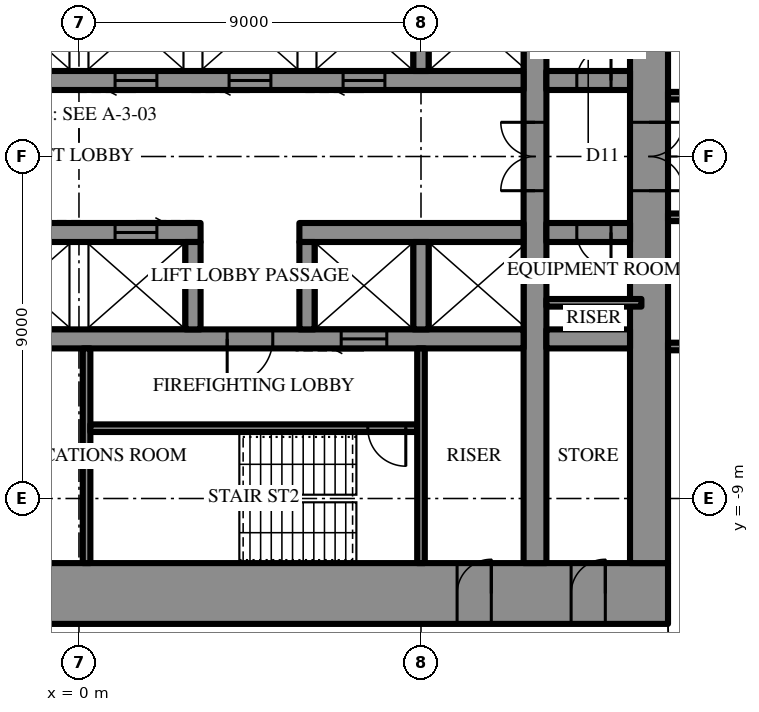
"""IFC4 building model, lengths in metres.
Left out: names, types, materials, properties, quantities, classifications, styles, units other than length and angle.
Written with IfcOpenShell. Run it as: python <this file> out.ifc"""

import sys

from ifc_helpers import new_model, si_unit, direction, frame, frame_2d, origin, place, context, subcontext, project, spatial, rectangle, extrude, element, fill, save


model = new_model("IFC4")
c1 = context("Model", 3, precision=1e-05, world=origin(), true_north=direction((0.0, 1.0)))
c2 = subcontext(c1, "Body", "Model", "MODEL_VIEW")
j1 = project(units=[si_unit("LENGTHUNIT", "METRE"), si_unit("PLANEANGLEUNIT", "RADIAN")], contexts=[c1])
p1 = place(None, origin())
s1 = spatial("IfcSite", under=j1, at=p1, CompositionType="ELEMENT")
p2 = place(p1, origin())
s2 = spatial("IfcBuilding", under=s1, at=p2, CompositionType="ELEMENT")
p3 = place(p2, frame((0.0, 0.0, 236.5)))
s3 = spatial("IfcBuildingStorey", under=s2, at=p3, CompositionType="ELEMENT", Elevation=236.5)
p4 = place(p3, frame((15.5, -11.5, 0.0), z_axis=(0.0, 0.0, 1.0), x_axis=(-1.0, 0.0, 0.0)))
e1 = element("IfcWall", 1, at=p4, inside=s3, PredefinedType="SHEAR", context=c2, shape_type="SweptSolid", body=[
    extrude(rectangle(XDim=31.0, YDim=1.6, at=frame_2d((15.5, 0.0))), origin(), (0.0, 0.0, 1.0), 4.2),
])
p5 = place(p4, frame((16.35, 0.0, 0.0)))
e2 = element("IfcOpeningElement", 2, at=p5, cuts=e1, PredefinedType="OPENING", context=c2, shape_type="SweptSolid", body=[
    extrude(rectangle(XDim=0.9, YDim=2.2, at=frame_2d((0.45, 1.1))), frame((0.0, 0.81, 0.0), z_axis=(0.0, -1.0, 0.0), x_axis=(1.0, 0.0, 0.0)), (0.0, 0.0, 1.0), 1.62),
])
p6 = place(p4, frame((19.35, 0.0, 0.0)))
e3 = element("IfcOpeningElement", 3, at=p6, cuts=e1, PredefinedType="OPENING", context=c2, shape_type="SweptSolid", body=[
    extrude(rectangle(XDim=0.9, YDim=2.2, at=frame_2d((0.45, 1.1))), frame((0.0, 0.81, 0.0), z_axis=(0.0, -1.0, 0.0), x_axis=(1.0, 0.0, 0.0)), (0.0, 0.0, 1.0), 1.62),
])
p7 = place(p4, frame((22.4, 0.0, 0.0)))
e4 = element("IfcOpeningElement", 4, at=p7, cuts=e1, PredefinedType="OPENING", context=c2, shape_type="SweptSolid", body=[
    extrude(rectangle(XDim=1.0, YDim=2.2, at=frame_2d((0.5, 1.1))), frame((0.0, 0.81, 0.0), z_axis=(0.0, -1.0, 0.0), x_axis=(1.0, 0.0, 0.0)), (0.0, 0.0, 1.0), 1.62),
])
p8 = place(p4, frame((1.65, 0.0, 0.0)))
e5 = element("IfcOpeningElement", 5, at=p8, cuts=e1, PredefinedType="OPENING", context=c2, shape_type="SweptSolid", body=[
    extrude(rectangle(XDim=0.9, YDim=2.2, at=frame_2d((0.45, 1.1))), frame((0.0, 0.81, 0.0), z_axis=(0.0, -1.0, 0.0), x_axis=(1.0, 0.0, 0.0)), (0.0, 0.0, 1.0), 1.62),
])
p9 = place(p4, frame((4.65, 0.0, 0.0)))
e6 = element("IfcOpeningElement", 6, at=p9, cuts=e1, PredefinedType="OPENING", context=c2, shape_type="SweptSolid", body=[
    extrude(rectangle(XDim=0.9, YDim=2.2, at=frame_2d((0.45, 1.1))), frame((0.0, 0.81, 0.0), z_axis=(0.0, -1.0, 0.0), x_axis=(1.0, 0.0, 0.0)), (0.0, 0.0, 1.0), 1.62),
])
p10 = place(p4, frame((25.45, 0.0, 0.0)))
e7 = element("IfcOpeningElement", 7, at=p10, cuts=e1, PredefinedType="OPENING", context=c2, shape_type="SweptSolid", body=[
    extrude(rectangle(XDim=0.9, YDim=2.2, at=frame_2d((0.45, 1.1))), frame((0.0, 0.81, 0.0), z_axis=(0.0, -1.0, 0.0), x_axis=(1.0, 0.0, 0.0)), (0.0, 0.0, 1.0), 1.62),
])
p11 = place(p4, frame((28.45, 0.0, 0.0)))
e8 = element("IfcOpeningElement", 8, at=p11, cuts=e1, PredefinedType="OPENING", context=c2, shape_type="SweptSolid", body=[
    extrude(rectangle(XDim=0.9, YDim=2.2, at=frame_2d((0.45, 1.1))), frame((0.0, 0.81, 0.0), z_axis=(0.0, -1.0, 0.0), x_axis=(1.0, 0.0, 0.0)), (0.0, 0.0, 1.0), 1.62),
])
p12 = place(p3, frame((15.0, -10.7, 0.0), z_axis=(0.0, 0.0, 1.0), x_axis=(0.0, 1.0, 0.0)))
e9 = element("IfcWall", 9, at=p12, inside=s3, PredefinedType="SHEAR", context=c2, shape_type="SweptSolid", body=[
    extrude(rectangle(XDim=21.4, YDim=1.0, at=frame_2d((10.7, 0.0))), origin(), (0.0, 0.0, 1.0), 4.2),
])
p13 = place(p12, frame((9.8, 0.0, 0.0)))
e10 = element("IfcOpeningElement", 10, at=p13, cuts=e9, PredefinedType="OPENING", context=c2, shape_type="SweptSolid", body=[
    extrude(rectangle(XDim=1.8, YDim=2.4, at=frame_2d((0.9, 1.2))), frame((0.0, 0.51, 0.0), z_axis=(0.0, -1.0, 0.0), x_axis=(1.0, 0.0, 0.0)), (0.0, 0.0, 1.0), 1.02),
])
p14 = place(p3, frame((12.0, -10.7, 0.0), z_axis=(0.0, 0.0, 1.0), x_axis=(0.0, 1.0, 0.0)))
e11 = element("IfcWall", 11, at=p14, inside=s3, PredefinedType="SHEAR", context=c2, shape_type="SweptSolid", body=[
    extrude(rectangle(XDim=21.4, YDim=0.6, at=frame_2d((10.7, 0.0))), origin(), (0.0, 0.0, 1.0), 4.2),
])
p15 = place(p14, frame((9.8, 0.0, 0.0)))
e12 = element("IfcOpeningElement", 12, at=p15, cuts=e11, PredefinedType="OPENING", context=c2, shape_type="SweptSolid", body=[
    extrude(rectangle(XDim=1.8, YDim=2.4, at=frame_2d((0.9, 1.2))), frame((0.0, 0.31, 0.0), z_axis=(0.0, -1.0, 0.0), x_axis=(1.0, 0.0, 0.0)), (0.0, 0.0, 1.0), 0.62),
])
p16 = place(p3, frame((-3.2, 2.0, 0.0), z_axis=(0.0, 0.0, 1.0), x_axis=(1.0, 0.0, 0.0)))
e13 = element("IfcWall", 13, at=p16, inside=s3, PredefinedType="SHEAR", context=c2, shape_type="SweptSolid", body=[
    extrude(rectangle(XDim=14.9, YDim=0.5, at=frame_2d((7.45, 0.0))), origin(), (0.0, 0.0, 1.0), 4.2),
])
p17 = place(p16, frame((1.15, 0.0, 0.0)))
e14 = element("IfcOpeningElement", 14, at=p17, cuts=e13, PredefinedType="OPENING", context=c2, shape_type="SweptSolid", body=[
    extrude(rectangle(XDim=1.1, YDim=2.2, at=frame_2d((0.55, 1.1))), frame((0.0, 0.26, 0.0), z_axis=(0.0, -1.0, 0.0), x_axis=(1.0, 0.0, 0.0)), (0.0, 0.0, 1.0), 0.52),
])
p18 = place(p16, frame((4.15, 0.0, 0.0)))
e15 = element("IfcOpeningElement", 15, at=p18, cuts=e13, PredefinedType="OPENING", context=c2, shape_type="SweptSolid", body=[
    extrude(rectangle(XDim=1.1, YDim=2.2, at=frame_2d((0.55, 1.1))), frame((0.0, 0.26, 0.0), z_axis=(0.0, -1.0, 0.0), x_axis=(1.0, 0.0, 0.0)), (0.0, 0.0, 1.0), 0.52),
])
p19 = place(p16, frame((7.15, 0.0, 0.0)))
e16 = element("IfcOpeningElement", 16, at=p19, cuts=e13, PredefinedType="OPENING", context=c2, shape_type="SweptSolid", body=[
    extrude(rectangle(XDim=1.1, YDim=2.2, at=frame_2d((0.55, 1.1))), frame((0.0, 0.26, 0.0), z_axis=(0.0, -1.0, 0.0), x_axis=(1.0, 0.0, 0.0)), (0.0, 0.0, 1.0), 0.52),
])
p20 = place(p16, frame((10.15, 0.0, 0.0)))
e17 = element("IfcOpeningElement", 17, at=p20, cuts=e13, PredefinedType="OPENING", context=c2, shape_type="SweptSolid", body=[
    extrude(rectangle(XDim=1.1, YDim=2.2, at=frame_2d((0.55, 1.1))), frame((0.0, 0.26, 0.0), z_axis=(0.0, -1.0, 0.0), x_axis=(1.0, 0.0, 0.0)), (0.0, 0.0, 1.0), 0.52),
])
p21 = place(p3, frame((12.3, 2.0, 0.0), z_axis=(0.0, 0.0, 1.0), x_axis=(1.0, 0.0, 0.0)))
e18 = element("IfcWall", 18, at=p21, inside=s3, PredefinedType="SHEAR", context=c2, shape_type="SweptSolid", body=[
    extrude(rectangle(XDim=2.2, YDim=0.5, at=frame_2d((1.1, 0.0))), origin(), (0.0, 0.0, 1.0), 4.2),
])
p22 = place(p21, frame((0.8, 0.0, 0.0)))
e19 = element("IfcOpeningElement", 19, at=p22, cuts=e18, PredefinedType="OPENING", context=c2, shape_type="SweptSolid", body=[
    extrude(rectangle(XDim=0.9, YDim=2.2, at=frame_2d((0.45, 1.1))), frame((0.0, 0.26, 0.0), z_axis=(0.0, -1.0, 0.0), x_axis=(1.0, 0.0, 0.0)), (0.0, 0.0, 1.0), 0.52),
])
p23 = place(p3, frame((9.0, 2.25, 0.0), z_axis=(0.0, 0.0, 1.0), x_axis=(0.0, 1.0, 0.0)))
e20 = element("IfcWall", 20, at=p23, inside=s3, PredefinedType="SHEAR", context=c2, shape_type="SweptSolid", body=[
    extrude(rectangle(XDim=2.3, YDim=0.4, at=frame_2d((1.15, 0.0))), origin(), (0.0, 0.0, 1.0), 4.2),
])
p24 = place(p3, frame((14.5, -2.0, 0.0), z_axis=(0.0, 0.0, 1.0), x_axis=(-1.0, 0.0, 0.0)))
e21 = element("IfcWall", 21, at=p24, inside=s3, PredefinedType="SHEAR", context=c2, shape_type="SweptSolid", body=[
    extrude(rectangle(XDim=2.2, YDim=0.5, at=frame_2d((1.1, 0.0))), origin(), (0.0, 0.0, 1.0), 4.2),
])
p25 = place(p24, frame((0.5, 0.0, 0.0)))
e22 = element("IfcOpeningElement", 22, at=p25, cuts=e21, PredefinedType="OPENING", context=c2, shape_type="SweptSolid", body=[
    extrude(rectangle(XDim=0.9, YDim=2.2, at=frame_2d((0.45, 1.1))), frame((0.0, 0.26, 0.0), z_axis=(0.0, -1.0, 0.0), x_axis=(1.0, 0.0, 0.0)), (0.0, 0.0, 1.0), 0.52),
])
p26 = place(p3, frame((11.7, -2.0, 0.0), z_axis=(0.0, 0.0, 1.0), x_axis=(-1.0, 0.0, 0.0)))
e23 = element("IfcWall", 23, at=p26, inside=s3, PredefinedType="SHEAR", context=c2, shape_type="SweptSolid", body=[
    extrude(rectangle(XDim=5.9, YDim=0.5, at=frame_2d((2.95, 0.0))), origin(), (0.0, 0.0, 1.0), 4.2),
])
p27 = place(p3, frame((3.2, -2.0, 0.0), z_axis=(0.0, 0.0, 1.0), x_axis=(-1.0, 0.0, 0.0)))
e24 = element("IfcWall", 24, at=p27, inside=s3, PredefinedType="SHEAR", context=c2, shape_type="SweptSolid", body=[
    extrude(rectangle(XDim=14.9, YDim=0.5, at=frame_2d((7.45, 0.0))), origin(), (0.0, 0.0, 1.0), 4.2),
])
p28 = place(p27, frame((1.15, 0.0, 0.0)))
e25 = element("IfcOpeningElement", 25, at=p28, cuts=e24, PredefinedType="OPENING", context=c2, shape_type="SweptSolid", body=[
    extrude(rectangle(XDim=1.1, YDim=2.2, at=frame_2d((0.55, 1.1))), frame((0.0, 0.26, 0.0), z_axis=(0.0, -1.0, 0.0), x_axis=(1.0, 0.0, 0.0)), (0.0, 0.0, 1.0), 0.52),
])
p29 = place(p27, frame((4.15, 0.0, 0.0)))
e26 = element("IfcOpeningElement", 26, at=p29, cuts=e24, PredefinedType="OPENING", context=c2, shape_type="SweptSolid", body=[
    extrude(rectangle(XDim=1.1, YDim=2.2, at=frame_2d((0.55, 1.1))), frame((0.0, 0.26, 0.0), z_axis=(0.0, -1.0, 0.0), x_axis=(1.0, 0.0, 0.0)), (0.0, 0.0, 1.0), 0.52),
])
p30 = place(p27, frame((7.15, 0.0, 0.0)))
e27 = element("IfcOpeningElement", 27, at=p30, cuts=e24, PredefinedType="OPENING", context=c2, shape_type="SweptSolid", body=[
    extrude(rectangle(XDim=1.1, YDim=2.2, at=frame_2d((0.55, 1.1))), frame((0.0, 0.26, 0.0), z_axis=(0.0, -1.0, 0.0), x_axis=(1.0, 0.0, 0.0)), (0.0, 0.0, 1.0), 0.52),
])
p31 = place(p27, frame((10.15, 0.0, 0.0)))
e28 = element("IfcOpeningElement", 28, at=p31, cuts=e24, PredefinedType="OPENING", context=c2, shape_type="SweptSolid", body=[
    extrude(rectangle(XDim=1.1, YDim=2.2, at=frame_2d((0.55, 1.1))), frame((0.0, 0.26, 0.0), z_axis=(0.0, -1.0, 0.0), x_axis=(1.0, 0.0, 0.0)), (0.0, 0.0, 1.0), 0.52),
])
p32 = place(p3, frame((14.5, -4.8, 0.0), z_axis=(0.0, 0.0, 1.0), x_axis=(-1.0, 0.0, 0.0)))
e29 = element("IfcWall", 29, at=p32, inside=s3, PredefinedType="SHEAR", context=c2, shape_type="SweptSolid", body=[
    extrude(rectangle(XDim=2.2, YDim=0.5, at=frame_2d((1.1, 0.0))), origin(), (0.0, 0.0, 1.0), 4.2),
])
p33 = place(p3, frame((11.7, -4.8, 0.0), z_axis=(0.0, 0.0, 1.0), x_axis=(-1.0, 0.0, 0.0)))
e30 = element("IfcWall", 30, at=p33, inside=s3, PredefinedType="SHEAR", context=c2, shape_type="SweptSolid", body=[
    extrude(rectangle(XDim=23.4, YDim=0.5, at=frame_2d((11.7, 0.0))), origin(), (0.0, 0.0, 1.0), 4.2),
])
p34 = place(p33, frame((6.6, 0.0, 0.0)))
e31 = element("IfcOpeningElement", 31, at=p34, cuts=e30, PredefinedType="OPENING", context=c2, shape_type="SweptSolid", body=[
    extrude(rectangle(XDim=1.2, YDim=2.2, at=frame_2d((0.6, 1.1))), frame((0.0, 0.26, 0.0), z_axis=(0.0, -1.0, 0.0), x_axis=(1.0, 0.0, 0.0)), (0.0, 0.0, 1.0), 0.52),
])
p35 = place(p33, frame((3.6, 0.0, 0.0)))
e32 = element("IfcOpeningElement", 32, at=p35, cuts=e30, PredefinedType="OPENING", context=c2, shape_type="SweptSolid", body=[
    extrude(rectangle(XDim=1.2, YDim=2.2, at=frame_2d((0.6, 1.1))), frame((0.0, 0.26, 0.0), z_axis=(0.0, -1.0, 0.0), x_axis=(1.0, 0.0, 0.0)), (0.0, 0.0, 1.0), 0.52),
])
for number, where, z_axis, x_axis in (
    (33, (9.0, -2.25, 0.0), (0.0, 0.0, 1.0), (0.0, -1.0, 0.0)),
    (34, (6.0, -2.25, 0.0), (0.0, 0.0, 1.0), (0.0, -1.0, 0.0)),
    (35, (3.0, -2.25, 0.0), (0.0, 0.0, 1.0), (0.0, -1.0, 0.0)),
):
    element("IfcWall", number, at=place(p3, frame(where, z_axis=z_axis, x_axis=x_axis)), inside=s3, PredefinedType="SHEAR", context=c2, shape_type="SweptSolid", body=[
        extrude(rectangle(XDim=2.3, YDim=0.4, at=frame_2d((1.15, 0.0))), origin(), (0.0, 0.0, 1.0), 4.2),
    ])
p36 = place(p3, frame((0.2, -5.05, 0.0), z_axis=(0.0, 0.0, 1.0), x_axis=(0.0, -1.0, 0.0)))
e36 = element("IfcWall", 36, at=p36, inside=s3, PredefinedType="SHEAR", context=c2, shape_type="SweptSolid", body=[
    extrude(rectangle(XDim=5.65, YDim=0.2, at=frame_2d((2.825, 0.0))), origin(), (0.0, 0.0, 1.0), 4.2),
])
p37 = place(p3, frame((8.9, -7.15, 0.0), z_axis=(0.0, 0.0, 1.0), x_axis=(-1.0, 0.0, 0.0)))
e37 = element("IfcWall", 37, at=p37, inside=s3, PredefinedType="SHEAR", context=c2, shape_type="SweptSolid", body=[
    extrude(rectangle(XDim=8.6, YDim=0.2, at=frame_2d((4.3, 0.0))), origin(), (0.0, 0.0, 1.0), 4.2),
])
p38 = place(p37, frame((0.3, 0.0, 0.0)))
e38 = element("IfcOpeningElement", 38, at=p38, cuts=e37, PredefinedType="OPENING", context=c2, shape_type="SweptSolid", body=[
    extrude(rectangle(XDim=1.0, YDim=2.2, at=frame_2d((0.5, 1.1))), frame((0.0, 0.11, 0.0), z_axis=(0.0, -1.0, 0.0), x_axis=(1.0, 0.0, 0.0)), (0.0, 0.0, 1.0), 0.22),
])
p39 = place(p3, frame((9.0, -5.05, 0.0), z_axis=(0.0, 0.0, 1.0), x_axis=(0.0, -1.0, 0.0)))
e39 = element("IfcWall", 39, at=p39, inside=s3, PredefinedType="PARTITIONING", context=c2, shape_type="SweptSolid", body=[
    extrude(rectangle(XDim=5.65, YDim=0.2, at=frame_2d((2.825, 0.0))), origin(), (0.0, 0.0, 1.0), 4.0),
])
p40 = place(p3, frame((14.8, -3.85, 0.0), z_axis=(0.0, 0.0, 1.0), x_axis=(-1.0, 0.0, 0.0)))
e40 = element("IfcWall", 40, at=p40, inside=s3, PredefinedType="PARTITIONING", context=c2, shape_type="SweptSolid", body=[
    extrude(rectangle(XDim=2.5, YDim=0.2, at=frame_2d((1.25, 0.0))), origin(), (0.0, 0.0, 1.0), 4.0),
])
p41 = place(p3, frame((15.5, 1.6, 0.0), z_axis=(0.0, 0.0, 1.0), x_axis=(1.0, 0.0, 0.0)))
e41 = element("IfcWall", 41, at=p41, inside=s3, PredefinedType="PARTITIONING", context=c2, shape_type="SweptSolid", body=[
    extrude(rectangle(XDim=11.7, YDim=0.2, at=frame_2d((5.85, 0.0))), origin(), (0.0, 0.0, 1.0), 4.0),
])
p42 = place(p41, frame((3.01, 0.0, 0.0)))
e42 = element("IfcOpeningElement", 42, at=p42, cuts=e41, PredefinedType="OPENING", context=c2, shape_type="SweptSolid", body=[
    extrude(rectangle(XDim=1.0, YDim=2.2, at=frame_2d((0.5, 1.1))), frame((0.0, 0.11, 0.0), z_axis=(0.0, -1.0, 0.0), x_axis=(1.0, 0.0, 0.0)), (0.0, 0.0, 1.0), 0.22),
])
p43 = place(p3, frame((15.5, -1.6, 0.0), z_axis=(0.0, 0.0, 1.0), x_axis=(1.0, 0.0, 0.0)))
e43 = element("IfcWall", 43, at=p43, inside=s3, PredefinedType="PARTITIONING", context=c2, shape_type="SweptSolid", body=[
    extrude(rectangle(XDim=11.7, YDim=0.2, at=frame_2d((5.85, 0.0))), origin(), (0.0, 0.0, 1.0), 4.0),
])
p44 = place(p43, frame((3.01, 0.0, 0.0)))
e44 = element("IfcOpeningElement", 44, at=p44, cuts=e43, PredefinedType="OPENING", context=c2, shape_type="SweptSolid", body=[
    extrude(rectangle(XDim=1.0, YDim=2.2, at=frame_2d((0.5, 1.1))), frame((0.0, 0.11, 0.0), z_axis=(0.0, -1.0, 0.0), x_axis=(1.0, 0.0, 0.0)), (0.0, 0.0, 1.0), 0.22),
])
p45 = place(p3, frame((15.5, -5.0, 0.0), z_axis=(0.0, 0.0, 1.0), x_axis=(1.0, 0.0, 0.0)))
e45 = element("IfcWall", 45, at=p45, inside=s3, PredefinedType="PARTITIONING", context=c2, shape_type="SweptSolid", body=[
    extrude(rectangle(XDim=14.845, YDim=0.2, at=frame_2d((7.423, 0.0))), origin(), (0.0, 0.0, 1.0), 4.0),
])
p46 = place(p45, frame((0.985, 0.0, 0.0)))
e46 = element("IfcOpeningElement", 46, at=p46, cuts=e45, PredefinedType="OPENING", context=c2, shape_type="SweptSolid", body=[
    extrude(rectangle(XDim=1.0, YDim=2.2, at=frame_2d((0.5, 1.1))), frame((0.0, 0.11, 0.0), z_axis=(0.0, -1.0, 0.0), x_axis=(1.0, 0.0, 0.0)), (0.0, 0.0, 1.0), 0.22),
])
p47 = place(p13, frame((1.8, 0.0, 0.0), z_axis=(0.0, 0.0, 1.0), x_axis=(-1.0, 0.0, 0.0)))
e47 = element("IfcDoor", 47, at=p47, inside=s3, OperationType="DOUBLE_DOOR_SINGLE_SWING", PredefinedType="DOOR", context=c2, shape_type="SweptSolid", body=[
    extrude(rectangle(XDim=1.8, YDim=2.4, at=frame_2d((0.9, 1.2))), frame((0.0, 0.025, 0.0), z_axis=(0.0, -1.0, 0.0), x_axis=(1.0, 0.0, 0.0)), (0.0, 0.0, 1.0), 0.05),
])
fill(e10, e47)
p48 = place(p34, origin())
e48 = element("IfcDoor", 48, at=p48, inside=s3, OperationType="SINGLE_SWING_LEFT", PredefinedType="DOOR", context=c2, shape_type="SweptSolid", body=[
    extrude(rectangle(XDim=1.2, YDim=2.2, at=frame_2d((0.6, 1.1))), frame((0.0, 0.025, 0.0), z_axis=(0.0, -1.0, 0.0), x_axis=(1.0, 0.0, 0.0)), (0.0, 0.0, 1.0), 0.05),
])
fill(e31, e48)
p49 = place(p38, origin())
e49 = element("IfcDoor", 49, at=p49, inside=s3, OperationType="SINGLE_SWING_RIGHT", PredefinedType="DOOR", context=c2, shape_type="SweptSolid", body=[
    extrude(rectangle(XDim=1.0, YDim=2.2, at=frame_2d((0.5, 1.1))), frame((0.0, 0.025, 0.0), z_axis=(0.0, -1.0, 0.0), x_axis=(1.0, 0.0, 0.0)), (0.0, 0.0, 1.0), 0.05),
])
fill(e38, e49)
p50 = place(p8, frame((0.9, 0.0, 0.0), z_axis=(0.0, 0.0, 1.0), x_axis=(-1.0, 0.0, 0.0)))
e50 = element("IfcDoor", 50, at=p50, inside=s3, OperationType="SINGLE_SWING_LEFT", PredefinedType="DOOR", context=c2, shape_type="SweptSolid", body=[
    extrude(rectangle(XDim=0.9, YDim=2.2, at=frame_2d((0.45, 1.1))), frame((0.0, 0.025, 0.0), z_axis=(0.0, -1.0, 0.0), x_axis=(1.0, 0.0, 0.0)), (0.0, 0.0, 1.0), 0.05),
])
fill(e5, e50)
p51 = place(p9, frame((0.9, 0.0, 0.0), z_axis=(0.0, 0.0, 1.0), x_axis=(-1.0, 0.0, 0.0)))
e51 = element("IfcDoor", 51, at=p51, inside=s3, OperationType="SINGLE_SWING_LEFT", PredefinedType="DOOR", context=c2, shape_type="SweptSolid", body=[
    extrude(rectangle(XDim=0.9, YDim=2.2, at=frame_2d((0.45, 1.1))), frame((0.0, 0.025, 0.0), z_axis=(0.0, -1.0, 0.0), x_axis=(1.0, 0.0, 0.0)), (0.0, 0.0, 1.0), 0.05),
])
fill(e6, e51)
p52 = place(p22, origin())
e52 = element("IfcDoor", 52, at=p52, inside=s3, OperationType="SINGLE_SWING_LEFT", PredefinedType="DOOR", context=c2, shape_type="SweptSolid", body=[
    extrude(rectangle(XDim=0.9, YDim=2.2, at=frame_2d((0.45, 1.1))), frame((0.0, 0.025, 0.0), z_axis=(0.0, -1.0, 0.0), x_axis=(1.0, 0.0, 0.0)), (0.0, 0.0, 1.0), 0.05),
])
fill(e19, e52)
p53 = place(p25, origin())
e53 = element("IfcDoor", 53, at=p53, inside=s3, OperationType="SINGLE_SWING_RIGHT", PredefinedType="DOOR", context=c2, shape_type="SweptSolid", body=[
    extrude(rectangle(XDim=0.9, YDim=2.2, at=frame_2d((0.45, 1.1))), frame((0.0, 0.025, 0.0), z_axis=(0.0, -1.0, 0.0), x_axis=(1.0, 0.0, 0.0)), (0.0, 0.0, 1.0), 0.05),
])
fill(e22, e53)
p54 = place(p15, origin())
e54 = element("IfcDoor", 54, at=p54, inside=s3, OperationType="DOUBLE_DOOR_SINGLE_SWING", PredefinedType="DOOR", context=c2, shape_type="SweptSolid", body=[
    extrude(rectangle(XDim=1.8, YDim=2.4, at=frame_2d((0.9, 1.2))), frame((0.0, 0.025, 0.0), z_axis=(0.0, -1.0, 0.0), x_axis=(1.0, 0.0, 0.0)), (0.0, 0.0, 1.0), 0.05),
])
fill(e12, e54)
p55 = place(p18, frame((1.1, 0.0, 0.0), z_axis=(0.0, 0.0, 1.0), x_axis=(-1.0, 0.0, 0.0)))
e55 = element("IfcDoor", 55, at=p55, inside=s3, OperationType="SLIDING_TO_LEFT", PredefinedType="DOOR", context=c2, shape_type="SweptSolid", body=[
    extrude(rectangle(XDim=1.1, YDim=2.2, at=frame_2d((0.55, 1.1))), frame((0.0, 0.025, 0.0), z_axis=(0.0, -1.0, 0.0), x_axis=(1.0, 0.0, 0.0)), (0.0, 0.0, 1.0), 0.05),
])
fill(e15, e55)
p56 = place(p19, frame((1.1, 0.0, 0.0), z_axis=(0.0, 0.0, 1.0), x_axis=(-1.0, 0.0, 0.0)))
e56 = element("IfcDoor", 56, at=p56, inside=s3, OperationType="SLIDING_TO_LEFT", PredefinedType="DOOR", context=c2, shape_type="SweptSolid", body=[
    extrude(rectangle(XDim=1.1, YDim=2.2, at=frame_2d((0.55, 1.1))), frame((0.0, 0.025, 0.0), z_axis=(0.0, -1.0, 0.0), x_axis=(1.0, 0.0, 0.0)), (0.0, 0.0, 1.0), 0.05),
])
fill(e16, e56)
p57 = place(p20, frame((1.1, 0.0, 0.0), z_axis=(0.0, 0.0, 1.0), x_axis=(-1.0, 0.0, 0.0)))
e57 = element("IfcDoor", 57, at=p57, inside=s3, OperationType="SLIDING_TO_LEFT", PredefinedType="DOOR", context=c2, shape_type="SweptSolid", body=[
    extrude(rectangle(XDim=1.1, YDim=2.2, at=frame_2d((0.55, 1.1))), frame((0.0, 0.025, 0.0), z_axis=(0.0, -1.0, 0.0), x_axis=(1.0, 0.0, 0.0)), (0.0, 0.0, 1.0), 0.05),
])
fill(e17, e57)
p58 = place(p35, origin())
e58 = element("IfcDoor", 58, at=p58, inside=s3, OperationType="SLIDING_TO_LEFT", PredefinedType="DOOR", context=c2, shape_type="SweptSolid", body=[
    extrude(rectangle(XDim=1.2, YDim=2.2, at=frame_2d((0.6, 1.1))), frame((0.0, 0.025, 0.0), z_axis=(0.0, -1.0, 0.0), x_axis=(1.0, 0.0, 0.0)), (0.0, 0.0, 1.0), 0.05),
])
fill(e32, e58)
p59 = place(p28, frame((1.1, 0.0, 0.0), z_axis=(0.0, 0.0, 1.0), x_axis=(-1.0, 0.0, 0.0)))
e59 = element("IfcDoor", 59, at=p59, inside=s3, OperationType="SLIDING_TO_LEFT", PredefinedType="DOOR", context=c2, shape_type="SweptSolid", body=[
    extrude(rectangle(XDim=1.1, YDim=2.2, at=frame_2d((0.55, 1.1))), frame((0.0, 0.025, 0.0), z_axis=(0.0, -1.0, 0.0), x_axis=(1.0, 0.0, 0.0)), (0.0, 0.0, 1.0), 0.05),
])
fill(e25, e59)
save(model, sys.argv[1])
